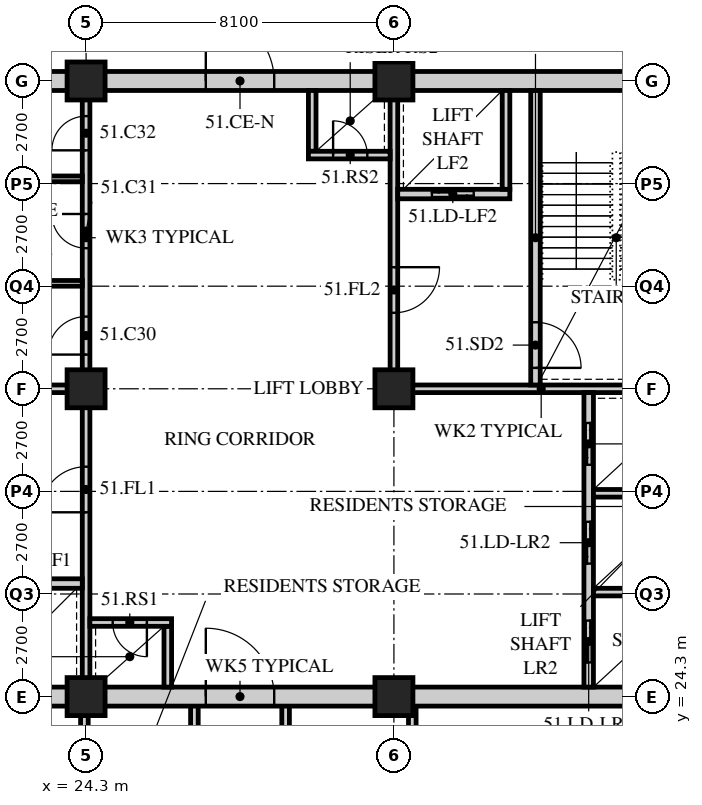
"""IFC4 building model, lengths in metres.
Left out: names, types, materials, properties, quantities, classifications, styles, units other than length and angle.
Written with IfcOpenShell. Run it as: python <this file> out.ifc"""

import sys

from ifc_helpers import new_model, si_unit, direction, frame, frame_2d, origin, origin_2d, place, context, subcontext, project, spatial, rectangle, hollow_rectangle, extrude, element, fill, save


model = new_model("IFC4")
c1 = context("Model", 3, precision=1e-05, world=origin(), true_north=direction((0.0, 1.0)))
c2 = subcontext(c1, "Body", "Model", "MODEL_VIEW")
j1 = project(units=[si_unit("LENGTHUNIT", "METRE"), si_unit("PLANEANGLEUNIT", "RADIAN")], contexts=[c1])
p1 = place(None, origin())
s1 = spatial("IfcSite", under=j1, at=p1, CompositionType="ELEMENT")
p2 = place(p1, origin())
s2 = spatial("IfcBuilding", under=s1, at=p2, CompositionType="ELEMENT")
p3 = place(p2, frame((0.0, 0.0, 199.2)))
s3 = spatial("IfcBuildingStorey", under=s2, at=p3, CompositionType="ELEMENT", Elevation=199.2)
for number, where, z_axis, x_axis in (
    (1, (24.3, 24.3, 0.0), (0.0, 0.0, 1.0), (1.0, 0.0, 0.0)),
    (2, (24.3, 32.4, 0.0), (0.0, 0.0, 1.0), (1.0, 0.0, 0.0)),
    (3, (24.3, 40.5, 0.0), (0.0, 0.0, 1.0), (1.0, 0.0, 0.0)),
    (4, (32.4, 24.3, 0.0), (0.0, 0.0, 1.0), (1.0, 0.0, 0.0)),
    (5, (32.4, 32.4, 0.0), (0.0, 0.0, 1.0), (1.0, 0.0, 0.0)),
    (6, (32.4, 40.5, 0.0), (0.0, 0.0, 1.0), (1.0, 0.0, 0.0)),
):
    element("IfcColumn", number, at=place(p3, frame(where, z_axis=z_axis, x_axis=x_axis)), inside=s3, PredefinedType="COLUMN", context=c2, shape_type="SweptSolid", body=[
        extrude(hollow_rectangle(XDim=1.0, YDim=1.0, WallThickness=0.1, at=origin_2d()), origin(), (0.0, 0.0, 1.0), 3.6),
    ])
p4 = place(p3, frame((24.256, 20.7, 0.0), z_axis=(0.0, 0.0, 1.0), x_axis=(0.0, 1.0, 0.0)))
e7 = element("IfcWall", 7, at=p4, inside=s3, PredefinedType="SOLIDWALL", context=c2, shape_type="SweptSolid", body=[
    extrude(rectangle(XDim=3.6, YDim=0.2, at=frame_2d((1.8, 0.0))), origin(), (0.0, 0.0, 1.0), 2.778),
])
for number, where, z_axis, x_axis in (
    (8, (32.883, 20.7, 0.0), (0.0, 0.0, 1.0), (0.0, 1.0, 0.0)),
    (9, (27.15, 20.7, 0.0), (0.0, 0.0, 1.0), (0.0, 1.0, 0.0)),
    (10, (29.55, 20.7, 0.0), (0.0, 0.0, 1.0), (0.0, 1.0, 0.0)),
):
    element("IfcWall", number, at=place(p3, frame(where, z_axis=z_axis, x_axis=x_axis)), inside=s3, PredefinedType="SOLIDWALL", context=c2, shape_type="SweptSolid", body=[
        extrude(rectangle(XDim=3.6, YDim=0.2, at=frame_2d((1.8, 0.0))), origin(), (0.0, 0.0, 1.0), 3.39),
    ])
p5 = place(p3, frame((15.95, 24.3, 0.0), z_axis=(0.0, 0.0, 1.0), x_axis=(1.0, 0.0, 0.0)))
e11 = element("IfcWall", 11, at=p5, inside=s3, PredefinedType="SOLIDWALL", context=c2, shape_type="SweptSolid", body=[
    extrude(rectangle(XDim=24.8, YDim=0.5, at=frame_2d((12.4, 0.0))), origin(), (0.0, 0.0, 1.0), 2.74),
])
p6 = place(p5, frame((11.5, 0.0, 0.0)))
e12 = element("IfcOpeningElement", 12, at=p6, cuts=e11, PredefinedType="OPENING", context=c2, shape_type="SweptSolid", body=[
    extrude(rectangle(XDim=1.8, YDim=2.4, at=frame_2d((0.9, 1.2))), frame((0.0, 0.26, 0.0), z_axis=(0.0, -1.0, 0.0), x_axis=(1.0, 0.0, 0.0)), (0.0, 0.0, 1.0), 0.52),
])
p7 = place(p3, frame((15.95, 40.5, 0.0), z_axis=(0.0, 0.0, 1.0), x_axis=(1.0, 0.0, 0.0)))
e13 = element("IfcWall", 13, at=p7, inside=s3, PredefinedType="SOLIDWALL", context=c2, shape_type="SweptSolid", body=[
    extrude(rectangle(XDim=24.8, YDim=0.5, at=frame_2d((12.4, 0.0))), origin(), (0.0, 0.0, 1.0), 2.74),
])
p8 = place(p7, frame((11.5, 0.0, 0.0)))
e14 = element("IfcOpeningElement", 14, at=p8, cuts=e13, PredefinedType="OPENING", context=c2, shape_type="SweptSolid", body=[
    extrude(rectangle(XDim=1.8, YDim=2.4, at=frame_2d((0.9, 1.2))), frame((0.0, 0.26, 0.0), z_axis=(0.0, -1.0, 0.0), x_axis=(1.0, 0.0, 0.0)), (0.0, 0.0, 1.0), 0.52),
])
p9 = place(p3, frame((16.45, 32.4, 0.0), z_axis=(0.0, 0.0, 1.0), x_axis=(1.0, 0.0, 0.0)))
e15 = element("IfcWall", 15, at=p9, inside=s3, PredefinedType="SOLIDWALL", context=c2, shape_type="SweptSolid", body=[
    extrude(rectangle(XDim=7.95, YDim=0.2, at=frame_2d((3.975, 0.0))), origin(), (0.0, 0.0, 1.0), 2.778),
])
p10 = place(p3, frame((24.3, 24.55, 0.0), z_axis=(0.0, 0.0, 1.0), x_axis=(0.0, 1.0, 0.0)))
e16 = element("IfcWall", 16, at=p10, inside=s3, PredefinedType="SOLIDWALL", context=c2, shape_type="SweptSolid", body=[
    extrude(rectangle(XDim=7.75, YDim=0.2, at=frame_2d((3.875, 0.0))), origin(), (0.0, 0.0, 1.0), 2.778),
])
p11 = place(p10, frame((4.6, 0.0, 0.0)))
e17 = element("IfcOpeningElement", 17, at=p11, cuts=e16, PredefinedType="OPENING", context=c2, shape_type="SweptSolid", body=[
    extrude(rectangle(XDim=1.2, YDim=2.1, at=frame_2d((0.6, 1.05))), frame((0.0, 0.11, 0.0), z_axis=(0.0, -1.0, 0.0), x_axis=(1.0, 0.0, 0.0)), (0.0, 0.0, 1.0), 0.22),
])
p12 = place(p3, frame((21.25, 27.275, 0.0), z_axis=(0.0, 0.0, 1.0), x_axis=(1.0, 0.0, 0.0)))
e18 = element("IfcWall", 18, at=p12, inside=s3, PredefinedType="SOLIDWALL", context=c2, shape_type="SweptSolid", body=[
    extrude(rectangle(XDim=2.95, YDim=0.25, at=frame_2d((1.475, 0.0))), origin(), (0.0, 0.0, 1.0), 3.39),
])
p13 = place(p12, frame((0.95, 0.0, 0.0)))
e19 = element("IfcOpeningElement", 19, at=p13, cuts=e18, PredefinedType="OPENING", context=c2, shape_type="SweptSolid", body=[
    extrude(rectangle(XDim=1.1, YDim=2.4, at=frame_2d((0.55, 1.2))), frame((0.0, 0.135, 0.0), z_axis=(0.0, -1.0, 0.0), x_axis=(1.0, 0.0, 0.0)), (0.0, 0.0, 1.0), 0.27),
])
p14 = place(p3, frame((26.45, 24.55, 0.0), z_axis=(0.0, 0.0, 1.0), x_axis=(0.0, 1.0, 0.0)))
e20 = element("IfcWall", 20, at=p14, inside=s3, PredefinedType="SOLIDWALL", context=c2, shape_type="SweptSolid", body=[
    extrude(rectangle(XDim=1.6, YDim=0.2, at=frame_2d((0.8, 0.0))), origin(), (0.0, 0.0, 1.0), 3.39),
])
p15 = place(p3, frame((24.4, 26.25, 0.0), z_axis=(0.0, 0.0, 1.0), x_axis=(1.0, 0.0, 0.0)))
e21 = element("IfcWall", 21, at=p15, inside=s3, PredefinedType="SOLIDWALL", context=c2, shape_type="SweptSolid", body=[
    extrude(rectangle(XDim=2.15, YDim=0.2, at=frame_2d((1.075, 0.0))), origin(), (0.0, 0.0, 1.0), 3.39),
])
p16 = place(p15, frame((0.6, 0.0, 0.0)))
e22 = element("IfcOpeningElement", 22, at=p16, cuts=e21, PredefinedType="OPENING", context=c2, shape_type="SweptSolid", body=[
    extrude(rectangle(XDim=0.9, YDim=2.1, at=frame_2d((0.45, 1.05))), frame((0.0, 0.11, 0.0), z_axis=(0.0, -1.0, 0.0), x_axis=(1.0, 0.0, 0.0)), (0.0, 0.0, 1.0), 0.22),
])
p17 = place(p3, frame((32.3, 32.4, 0.0), z_axis=(0.0, 0.0, 1.0), x_axis=(1.0, 0.0, 0.0)))
e23 = element("IfcWall", 23, at=p17, inside=s3, PredefinedType="SOLIDWALL", context=c2, shape_type="SweptSolid", body=[
    extrude(rectangle(XDim=7.95, YDim=0.2, at=frame_2d((3.975, 0.0))), origin(), (0.0, 0.0, 1.0), 2.778),
])
p18 = place(p3, frame((32.4, 32.5, 0.0), z_axis=(0.0, 0.0, 1.0), x_axis=(0.0, 1.0, 0.0)))
e24 = element("IfcWall", 24, at=p18, inside=s3, PredefinedType="SOLIDWALL", context=c2, shape_type="SweptSolid", body=[
    extrude(rectangle(XDim=7.75, YDim=0.2, at=frame_2d((3.875, 0.0))), origin(), (0.0, 0.0, 1.0), 2.778),
])
p19 = place(p18, frame((1.9, 0.0, 0.0)))
e25 = element("IfcOpeningElement", 25, at=p19, cuts=e24, PredefinedType="OPENING", context=c2, shape_type="SweptSolid", body=[
    extrude(rectangle(XDim=1.2, YDim=2.1, at=frame_2d((0.6, 1.05))), frame((0.0, 0.11, 0.0), z_axis=(0.0, -1.0, 0.0), x_axis=(1.0, 0.0, 0.0)), (0.0, 0.0, 1.0), 0.22),
])
p20 = place(p3, frame((37.525, 24.55, 0.0), z_axis=(0.0, 0.0, 1.0), x_axis=(0.0, 1.0, 0.0)))
e26 = element("IfcWall", 26, at=p20, inside=s3, PredefinedType="SOLIDWALL", context=c2, shape_type="SweptSolid", body=[
    extrude(rectangle(XDim=7.75, YDim=0.25, at=frame_2d((3.875, 0.0))), origin(), (0.0, 0.0, 1.0), 3.39),
])
p21 = place(p20, frame((0.65, 0.0, 0.0)))
e27 = element("IfcOpeningElement", 27, at=p21, cuts=e26, PredefinedType="OPENING", context=c2, shape_type="SweptSolid", body=[
    extrude(rectangle(XDim=1.1, YDim=2.4, at=frame_2d((0.55, 1.2))), frame((0.0, 0.135, 0.0), z_axis=(0.0, -1.0, 0.0), x_axis=(1.0, 0.0, 0.0)), (0.0, 0.0, 1.0), 0.27),
])
p22 = place(p20, frame((3.25, 0.0, 0.0)))
e28 = element("IfcOpeningElement", 28, at=p22, cuts=e26, PredefinedType="OPENING", context=c2, shape_type="SweptSolid", body=[
    extrude(rectangle(XDim=1.1, YDim=2.4, at=frame_2d((0.55, 1.2))), frame((0.0, 0.135, 0.0), z_axis=(0.0, -1.0, 0.0), x_axis=(1.0, 0.0, 0.0)), (0.0, 0.0, 1.0), 0.27),
])
p23 = place(p20, frame((5.85, 0.0, 0.0)))
e29 = element("IfcOpeningElement", 29, at=p23, cuts=e26, PredefinedType="OPENING", context=c2, shape_type="SweptSolid", body=[
    extrude(rectangle(XDim=1.1, YDim=2.4, at=frame_2d((0.55, 1.2))), frame((0.0, 0.135, 0.0), z_axis=(0.0, -1.0, 0.0), x_axis=(1.0, 0.0, 0.0)), (0.0, 0.0, 1.0), 0.27),
])
for number, where, z_axis, x_axis in (
    (30, (37.65, 27.05, 0.0), (0.0, 0.0, 1.0), (1.0, 0.0, 0.0)),
    (31, (37.65, 29.65, 0.0), (0.0, 0.0, 1.0), (1.0, 0.0, 0.0)),
):
    element("IfcWall", number, at=place(p3, frame(where, z_axis=z_axis, x_axis=x_axis)), inside=s3, PredefinedType="SOLIDWALL", context=c2, shape_type="SweptSolid", body=[
        extrude(rectangle(XDim=2.6, YDim=0.2, at=frame_2d((1.3, 0.0))), origin(), (0.0, 0.0, 1.0), 3.39),
    ])
p24 = place(p3, frame((36.125, 32.5, 0.0), z_axis=(0.0, 0.0, 1.0), x_axis=(0.0, 1.0, 0.0)))
e32 = element("IfcWall", 32, at=p24, inside=s3, PredefinedType="SOLIDWALL", context=c2, shape_type="SweptSolid", body=[
    extrude(rectangle(XDim=7.75, YDim=0.25, at=frame_2d((3.875, 0.0))), origin(), (0.0, 0.0, 1.0), 3.39),
])
p25 = place(p24, frame((0.45, 0.0, 0.0)))
e33 = element("IfcOpeningElement", 33, at=p25, cuts=e32, PredefinedType="OPENING", context=c2, shape_type="SweptSolid", body=[
    extrude(rectangle(XDim=1.2, YDim=2.1, at=frame_2d((0.6, 1.05))), frame((0.0, 0.135, 0.0), z_axis=(0.0, -1.0, 0.0), x_axis=(1.0, 0.0, 0.0)), (0.0, 0.0, 1.0), 0.27),
])
p26 = place(p3, frame((32.5, 37.525, 0.0), z_axis=(0.0, 0.0, 1.0), x_axis=(1.0, 0.0, 0.0)))
e34 = element("IfcWall", 34, at=p26, inside=s3, PredefinedType="SOLIDWALL", context=c2, shape_type="SweptSolid", body=[
    extrude(rectangle(XDim=2.95, YDim=0.25, at=frame_2d((1.475, 0.0))), origin(), (0.0, 0.0, 1.0), 3.39),
])
p27 = place(p26, frame((0.9, 0.0, 0.0)))
e35 = element("IfcOpeningElement", 35, at=p27, cuts=e34, PredefinedType="OPENING", context=c2, shape_type="SweptSolid", body=[
    extrude(rectangle(XDim=1.1, YDim=2.4, at=frame_2d((0.55, 1.2))), frame((0.0, 0.135, 0.0), z_axis=(0.0, -1.0, 0.0), x_axis=(1.0, 0.0, 0.0)), (0.0, 0.0, 1.0), 0.27),
])
p28 = place(p3, frame((35.35, 37.65, 0.0), z_axis=(0.0, 0.0, 1.0), x_axis=(0.0, 1.0, 0.0)))
e36 = element("IfcWall", 36, at=p28, inside=s3, PredefinedType="SOLIDWALL", context=c2, shape_type="SweptSolid", body=[
    extrude(rectangle(XDim=2.6, YDim=0.2, at=frame_2d((1.3, 0.0))), origin(), (0.0, 0.0, 1.0), 3.39),
])
p29 = place(p3, frame((30.25, 38.65, 0.0), z_axis=(0.0, 0.0, 1.0), x_axis=(0.0, 1.0, 0.0)))
e37 = element("IfcWall", 37, at=p29, inside=s3, PredefinedType="SOLIDWALL", context=c2, shape_type="SweptSolid", body=[
    extrude(rectangle(XDim=1.6, YDim=0.2, at=frame_2d((0.8, 0.0))), origin(), (0.0, 0.0, 1.0), 3.39),
])
p30 = place(p3, frame((30.15, 38.55, 0.0), z_axis=(0.0, 0.0, 1.0), x_axis=(1.0, 0.0, 0.0)))
e38 = element("IfcWall", 38, at=p30, inside=s3, PredefinedType="SOLIDWALL", context=c2, shape_type="SweptSolid", body=[
    extrude(rectangle(XDim=2.15, YDim=0.2, at=frame_2d((1.075, 0.0))), origin(), (0.0, 0.0, 1.0), 3.39),
])
p31 = place(p30, frame((0.65, 0.0, 0.0)))
e39 = element("IfcOpeningElement", 39, at=p31, cuts=e38, PredefinedType="OPENING", context=c2, shape_type="SweptSolid", body=[
    extrude(rectangle(XDim=0.9, YDim=2.1, at=frame_2d((0.45, 1.05))), frame((0.0, 0.11, 0.0), z_axis=(0.0, -1.0, 0.0), x_axis=(1.0, 0.0, 0.0)), (0.0, 0.0, 1.0), 0.22),
])
p32 = place(p3, frame((24.3, 32.5, 0.0), z_axis=(0.0, 0.0, 1.0), x_axis=(0.0, 1.0, 0.0)))
e40 = element("IfcWall", 40, at=p32, inside=s3, PredefinedType="PARTITIONING", context=c2, shape_type="SweptSolid", body=[
    extrude(rectangle(XDim=7.75, YDim=0.2, at=frame_2d((3.875, 0.0))), origin(), (0.0, 0.0, 1.0), 2.778),
])
p33 = place(p32, frame((0.8, 0.0, 0.0)))
e41 = element("IfcOpeningElement", 41, at=p33, cuts=e40, PredefinedType="OPENING", context=c2, shape_type="SweptSolid", body=[
    extrude(rectangle(XDim=1.0, YDim=2.1, at=frame_2d((0.5, 1.05))), frame((0.0, 0.11, 0.0), z_axis=(0.0, -1.0, 0.0), x_axis=(1.0, 0.0, 0.0)), (0.0, 0.0, 1.0), 0.22),
])
p34 = place(p32, frame((3.6, 0.0, 0.0)))
e42 = element("IfcOpeningElement", 42, at=p34, cuts=e40, PredefinedType="OPENING", context=c2, shape_type="SweptSolid", body=[
    extrude(rectangle(XDim=0.9, YDim=2.1, at=frame_2d((0.45, 1.05))), frame((0.0, 0.11, 0.0), z_axis=(0.0, -1.0, 0.0), x_axis=(1.0, 0.0, 0.0)), (0.0, 0.0, 1.0), 0.22),
])
p35 = place(p32, frame((6.175, 0.0, 0.0)))
e43 = element("IfcOpeningElement", 43, at=p35, cuts=e40, PredefinedType="OPENING", context=c2, shape_type="SweptSolid", body=[
    extrude(rectangle(XDim=0.9, YDim=2.1, at=frame_2d((0.45, 1.05))), frame((0.0, 0.11, 0.0), z_axis=(0.0, -1.0, 0.0), x_axis=(1.0, 0.0, 0.0)), (0.0, 0.0, 1.0), 0.22),
])
for number, where, z_axis, x_axis in (
    (44, (21.65, 35.175, 0.0), (0.0, 0.0, 1.0), (1.0, 0.0, 0.0)),
    (45, (21.65, 37.925, 0.0), (0.0, 0.0, 1.0), (1.0, 0.0, 0.0)),
):
    element("IfcWall", number, at=place(p3, frame(where, z_axis=z_axis, x_axis=x_axis)), inside=s3, PredefinedType="PARTITIONING", context=c2, shape_type="SweptSolid", body=[
        extrude(rectangle(XDim=2.55, YDim=0.15, at=frame_2d((1.275, 0.0))), origin(), (0.0, 0.0, 1.0), 3.39),
    ])
p36 = place(p33, origin())
e46 = element("IfcDoor", 46, at=p36, inside=s3, OperationType="SINGLE_SWING_LEFT", PredefinedType="DOOR", context=c2, shape_type="SweptSolid", body=[
    extrude(rectangle(XDim=1.0, YDim=2.1, at=frame_2d((0.5, 1.05))), frame((0.0, 0.025, 0.0), z_axis=(0.0, -1.0, 0.0), x_axis=(1.0, 0.0, 0.0)), (0.0, 0.0, 1.0), 0.05),
])
fill(e41, e46)
p37 = place(p34, origin())
e47 = element("IfcDoor", 47, at=p37, inside=s3, OperationType="SINGLE_SWING_RIGHT", PredefinedType="DOOR", context=c2, shape_type="SweptSolid", body=[
    extrude(rectangle(XDim=0.9, YDim=2.1, at=frame_2d((0.45, 1.05))), frame((0.0, 0.025, 0.0), z_axis=(0.0, -1.0, 0.0), x_axis=(1.0, 0.0, 0.0)), (0.0, 0.0, 1.0), 0.05),
])
fill(e42, e47)
p38 = place(p35, origin())
e48 = element("IfcDoor", 48, at=p38, inside=s3, OperationType="SINGLE_SWING_LEFT", PredefinedType="DOOR", context=c2, shape_type="SweptSolid", body=[
    extrude(rectangle(XDim=0.9, YDim=2.1, at=frame_2d((0.45, 1.05))), frame((0.0, 0.025, 0.0), z_axis=(0.0, -1.0, 0.0), x_axis=(1.0, 0.0, 0.0)), (0.0, 0.0, 1.0), 0.05),
])
fill(e43, e48)
p39 = place(p11, origin())
e49 = element("IfcDoor", 49, at=p39, inside=s3, OperationType="SINGLE_SWING_LEFT", PredefinedType="DOOR", context=c2, shape_type="SweptSolid", body=[
    extrude(rectangle(XDim=1.2, YDim=2.1, at=frame_2d((0.6, 1.05))), frame((0.0, 0.025, 0.0), z_axis=(0.0, -1.0, 0.0), x_axis=(1.0, 0.0, 0.0)), (0.0, 0.0, 1.0), 0.05),
])
fill(e17, e49)
p40 = place(p16, origin())
e50 = element("IfcDoor", 50, at=p40, inside=s3, OperationType="SINGLE_SWING_LEFT", PredefinedType="DOOR", context=c2, shape_type="SweptSolid", body=[
    extrude(rectangle(XDim=0.9, YDim=2.1, at=frame_2d((0.45, 1.05))), frame((0.0, 0.025, 0.0), z_axis=(0.0, -1.0, 0.0), x_axis=(1.0, 0.0, 0.0)), (0.0, 0.0, 1.0), 0.05),
])
fill(e22, e50)
p41 = place(p25, origin())
e51 = element("IfcDoor", 51, at=p41, inside=s3, OperationType="SINGLE_SWING_RIGHT", PredefinedType="DOOR", context=c2, shape_type="SweptSolid", body=[
    extrude(rectangle(XDim=1.2, YDim=2.1, at=frame_2d((0.6, 1.05))), frame((0.0, 0.025, 0.0), z_axis=(0.0, -1.0, 0.0), x_axis=(1.0, 0.0, 0.0)), (0.0, 0.0, 1.0), 0.05),
])
fill(e33, e51)
p42 = place(p19, origin())
e52 = element("IfcDoor", 52, at=p42, inside=s3, OperationType="SINGLE_SWING_LEFT", PredefinedType="DOOR", context=c2, shape_type="SweptSolid", body=[
    extrude(rectangle(XDim=1.2, YDim=2.1, at=frame_2d((0.6, 1.05))), frame((0.0, 0.025, 0.0), z_axis=(0.0, -1.0, 0.0), x_axis=(1.0, 0.0, 0.0)), (0.0, 0.0, 1.0), 0.05),
])
fill(e25, e52)
p43 = place(p31, origin())
e53 = element("IfcDoor", 53, at=p43, inside=s3, OperationType="SINGLE_SWING_LEFT", PredefinedType="DOOR", context=c2, shape_type="SweptSolid", body=[
    extrude(rectangle(XDim=0.9, YDim=2.1, at=frame_2d((0.45, 1.05))), frame((0.0, 0.025, 0.0), z_axis=(0.0, -1.0, 0.0), x_axis=(1.0, 0.0, 0.0)), (0.0, 0.0, 1.0), 0.05),
])
fill(e39, e53)
p44 = place(p21, origin())
e54 = element("IfcDoor", 54, at=p44, inside=s3, OperationType="DOUBLE_DOOR_SLIDING", PredefinedType="DOOR", context=c2, shape_type="SweptSolid", body=[
    extrude(rectangle(XDim=1.1, YDim=2.4, at=frame_2d((0.55, 1.2))), frame((0.0, 0.025, 0.0), z_axis=(0.0, -1.0, 0.0), x_axis=(1.0, 0.0, 0.0)), (0.0, 0.0, 1.0), 0.05),
])
fill(e27, e54)
p45 = place(p22, origin())
e55 = element("IfcDoor", 55, at=p45, inside=s3, OperationType="DOUBLE_DOOR_SLIDING", PredefinedType="DOOR", context=c2, shape_type="SweptSolid", body=[
    extrude(rectangle(XDim=1.1, YDim=2.4, at=frame_2d((0.55, 1.2))), frame((0.0, 0.025, 0.0), z_axis=(0.0, -1.0, 0.0), x_axis=(1.0, 0.0, 0.0)), (0.0, 0.0, 1.0), 0.05),
])
fill(e28, e55)
p46 = place(p23, origin())
e56 = element("IfcDoor", 56, at=p46, inside=s3, OperationType="DOUBLE_DOOR_SLIDING", PredefinedType="DOOR", context=c2, shape_type="SweptSolid", body=[
    extrude(rectangle(XDim=1.1, YDim=2.4, at=frame_2d((0.55, 1.2))), frame((0.0, 0.025, 0.0), z_axis=(0.0, -1.0, 0.0), x_axis=(1.0, 0.0, 0.0)), (0.0, 0.0, 1.0), 0.05),
])
fill(e29, e56)
p47 = place(p27, origin())
e57 = element("IfcDoor", 57, at=p47, inside=s3, OperationType="DOUBLE_DOOR_SLIDING", PredefinedType="DOOR", context=c2, shape_type="SweptSolid", body=[
    extrude(rectangle(XDim=1.1, YDim=2.4, at=frame_2d((0.55, 1.2))), frame((0.0, 0.025, 0.0), z_axis=(0.0, -1.0, 0.0), x_axis=(1.0, 0.0, 0.0)), (0.0, 0.0, 1.0), 0.05),
])
fill(e35, e57)
p48 = place(p6, origin())
e58 = element("IfcDoor", 58, at=p48, inside=s3, OperationType="DOUBLE_DOOR_SINGLE_SWING", PredefinedType="DOOR", context=c2, shape_type="SweptSolid", body=[
    extrude(rectangle(XDim=1.8, YDim=2.4, at=frame_2d((0.9, 1.2))), frame((0.0, 0.025, 0.0), z_axis=(0.0, -1.0, 0.0), x_axis=(1.0, 0.0, 0.0)), (0.0, 0.0, 1.0), 0.05),
])
fill(e12, e58)
p49 = place(p8, origin())
e59 = element("IfcDoor", 59, at=p49, inside=s3, OperationType="DOUBLE_DOOR_SINGLE_SWING", PredefinedType="DOOR", context=c2, shape_type="SweptSolid", body=[
    extrude(rectangle(XDim=1.8, YDim=2.4, at=frame_2d((0.9, 1.2))), frame((0.0, 0.025, 0.0), z_axis=(0.0, -1.0, 0.0), x_axis=(1.0, 0.0, 0.0)), (0.0, 0.0, 1.0), 0.05),
])
fill(e14, e59)
save(model, sys.argv[1])
